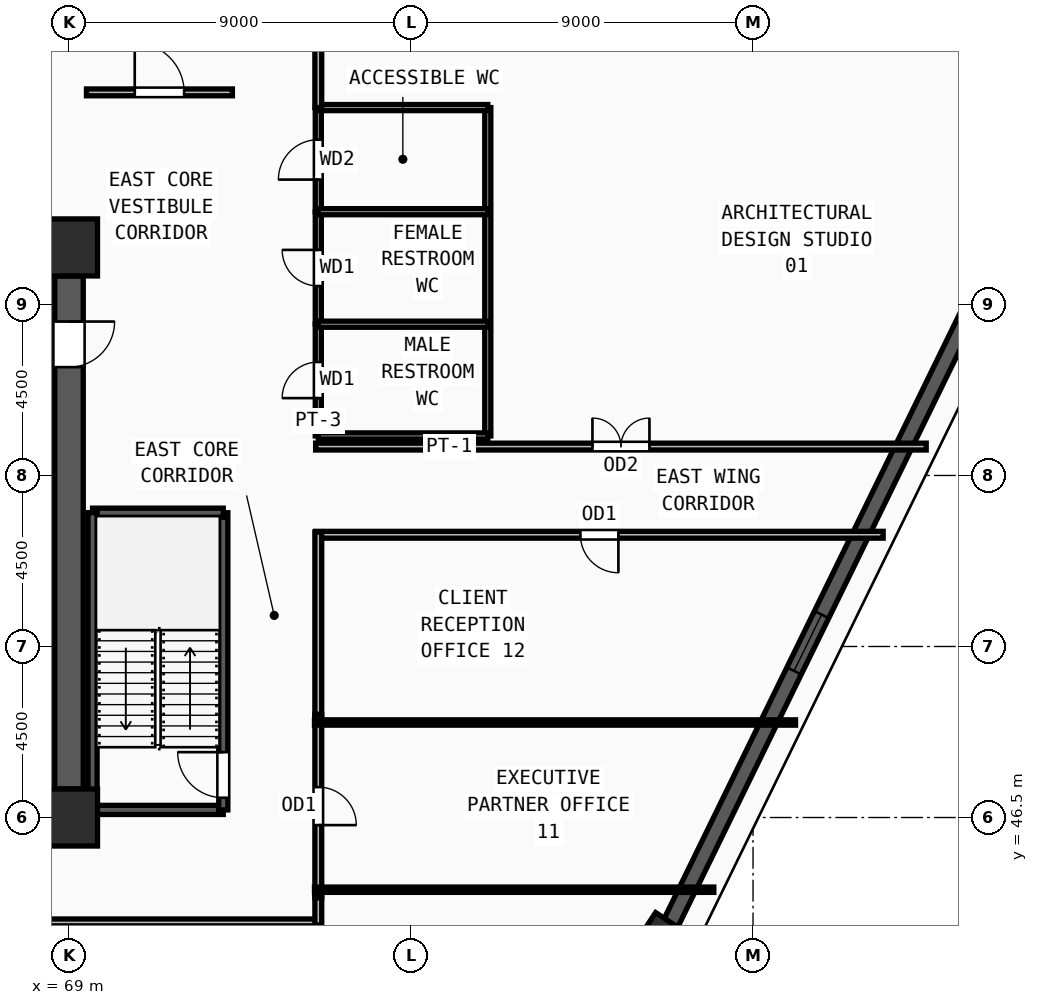
"""IFC4 building model, lengths in metres.
Left out: names, types, materials, properties, quantities, classifications, styles, units other than length and angle.
Written with IfcOpenShell. Run it as: python <this file> out.ifc"""

import sys

from ifc_helpers import new_model, si_unit, direction, frame, frame_2d, origin, origin_2d, place, context, subcontext, project, spatial, rectangle, extrude, source, transform, mapped, element, fill, save


model = new_model("IFC4")
c1 = context("Model", 3, precision=1e-05, world=origin(), true_north=direction((0.0, 1.0)))
c2 = subcontext(c1, "Body", "Model", "MODEL_VIEW")
j1 = project(units=[si_unit("LENGTHUNIT", "METRE"), si_unit("PLANEANGLEUNIT", "RADIAN")], contexts=[c1])
p1 = place(None, origin())
s1 = spatial("IfcSite", under=j1, at=p1, CompositionType="ELEMENT")
p2 = place(p1, origin())
s2 = spatial("IfcBuilding", under=s1, at=p2, CompositionType="ELEMENT")
p3 = place(p2, frame((0.0, 0.0, 102.0)))
s3 = spatial("IfcBuildingStorey", under=s2, at=p3, CompositionType="ELEMENT", Elevation=102.0)
m1 = source(origin(), c2, "Body", "SweptSolid", [
    extrude(rectangle(XDim=1.5, YDim=1.5, at=origin_2d()), origin(), (0.0, 0.0, 1.0), 3.75),
])
for number, where, z_axis, x_axis in (
    (1, (69.0, 46.5, 0.0), (0.0, 0.0, 1.0), (1.0, 0.0, 0.0)),
    (2, (69.0, 61.5, 0.0), (0.0, 0.0, 1.0), (1.0, 0.0, 0.0)),
):
    element("IfcColumn", number, at=place(p3, frame(where, z_axis=z_axis, x_axis=x_axis)), inside=s3, PredefinedType="COLUMN", context=c2, shape_type="MappedRepresentation", body=[
        mapped(m1, transform((0.0, 0.0, 0.0), x_axis=(1.0, 0.0, 0.0), y_axis=(0.0, 1.0, 0.0), z_axis=(0.0, 0.0, 1.0), scale=1.0)),
    ])
m2 = source(origin(), c2, "Body", "SweptSolid", [
    extrude(rectangle(XDim=1.4, YDim=1.15, at=origin_2d()), origin(), (0.0, 0.0, 1.0), 3.75),
])
p4 = place(p3, frame((84.533, 43.098, 0.0), z_axis=(0.0, 0.0, 1.0), x_axis=(0.549168685539, 0.83571152608, 0.0)))
e3 = element("IfcColumn", 3, at=p4, inside=s3, PredefinedType="COLUMN", context=c2, shape_type="MappedRepresentation", body=[
    mapped(m2, transform((0.0, 0.0, 0.0), x_axis=(1.0, 0.0, 0.0), y_axis=(0.0, 1.0, 0.0), z_axis=(0.0, 0.0, 1.0), scale=1.0)),
])
p5 = place(p3, frame((84.836, 43.718, 0.0), z_axis=(0.0, 0.0, 1.0), x_axis=(0.439006754844, 0.898483761234, 0.0)))
e4 = element("IfcWall", 4, at=p5, inside=s3, PredefinedType="SOLIDWALL", context=c2, shape_type="SweptSolid", body=[
    extrude(rectangle(XDim=26.656, YDim=0.42, at=frame_2d((13.328, 0.0))), origin(), (0.0, 0.0, 1.0), 3.57),
])
m3 = source(origin(), c2, "Body", "SweptSolid", [
    extrude(rectangle(XDim=1.65, YDim=1.95, at=frame_2d((0.825, 0.975))), frame((0.0, 0.22, 0.0), z_axis=(0.0, -1.0, 0.0), x_axis=(1.0, 0.0, 0.0)), (0.0, 0.0, 1.0), 0.44),
])
p6 = place(p5, frame((7.389, 0.0, 0.55)))
e5 = element("IfcOpeningElement", 5, at=p6, cuts=e4, PredefinedType="OPENING", context=c2, shape_type="MappedRepresentation", body=[
    mapped(m3, transform((0.0, 0.0, 0.0), x_axis=(1.0, 0.0, 0.0), y_axis=(0.0, 1.0, 0.0), z_axis=(0.0, 0.0, 1.0), scale=1.0)),
])
p7 = place(p5, frame((19.167, 0.0, 0.55)))
e6 = element("IfcOpeningElement", 6, at=p7, cuts=e4, PredefinedType="OPENING", context=c2, shape_type="MappedRepresentation", body=[
    mapped(m3, transform((0.0, 0.0, 0.0), x_axis=(1.0, 0.0, 0.0), y_axis=(0.0, 1.0, 0.0), z_axis=(0.0, 0.0, 1.0), scale=1.0)),
])
p8 = place(p3, frame((69.0, 60.75, 0.0), z_axis=(0.0, 0.0, 1.0), x_axis=(0.0, -1.0, 0.0)))
e7 = element("IfcWall", 7, at=p8, inside=s3, PredefinedType="SHEAR", context=c2, shape_type="SweptSolid", body=[
    extrude(rectangle(XDim=13.5, YDim=0.75, at=frame_2d((6.75, 0.0))), origin(), (0.0, 0.0, 1.0), 3.57),
])
m4 = source(origin(), c2, "Body", "SweptSolid", [
    extrude(rectangle(XDim=1.2, YDim=2.2, at=frame_2d((0.6, 1.1))), frame((0.0, 0.385, 0.0), z_axis=(0.0, -1.0, 0.0), x_axis=(1.0, 0.0, 0.0)), (0.0, 0.0, 1.0), 0.77),
])
p9 = place(p8, frame((1.2, 0.0, 0.0)))
e8 = element("IfcOpeningElement", 8, at=p9, cuts=e7, PredefinedType="OPENING", context=c2, shape_type="MappedRepresentation", body=[
    mapped(m4, transform((0.0, 0.0, 0.0), x_axis=(1.0, 0.0, 0.0), y_axis=(0.0, 1.0, 0.0), z_axis=(0.0, 0.0, 1.0), scale=1.0)),
])
p10 = place(p3, frame((69.62, 46.7, 0.0), z_axis=(0.0, 0.0, 1.0), x_axis=(1.0, 0.0, 0.0)))
e9 = element("IfcWall", 9, at=p10, inside=s3, PredefinedType="SOLIDWALL", context=c2, shape_type="SweptSolid", body=[
    extrude(rectangle(XDim=3.44, YDim=0.24, at=frame_2d((1.72, 0.0))), origin(), (0.0, 0.0, 1.0), 3.57),
])
p11 = place(p3, frame((73.06, 46.7, 0.0), z_axis=(0.0, 0.0, 1.0), x_axis=(0.0, 1.0, 0.0)))
e10 = element("IfcWall", 10, at=p11, inside=s3, PredefinedType="SOLIDWALL", context=c2, shape_type="SweptSolid", body=[
    extrude(rectangle(XDim=7.82, YDim=0.24, at=frame_2d((3.91, 0.0))), origin(), (0.0, 0.0, 1.0), 3.57),
])
m5 = source(origin(), c2, "Body", "SweptSolid", [
    extrude(rectangle(XDim=1.2, YDim=2.2, at=frame_2d((0.6, 1.1))), frame((0.0, 0.13, 0.0), z_axis=(0.0, -1.0, 0.0), x_axis=(1.0, 0.0, 0.0)), (0.0, 0.0, 1.0), 0.26),
])
p12 = place(p11, frame((0.32, 0.0, 0.0)))
e11 = element("IfcOpeningElement", 11, at=p12, cuts=e10, PredefinedType="OPENING", context=c2, shape_type="MappedRepresentation", body=[
    mapped(m5, transform((0.0, 0.0, 0.0), x_axis=(1.0, 0.0, 0.0), y_axis=(0.0, 1.0, 0.0), z_axis=(0.0, 0.0, 1.0), scale=1.0)),
])
p13 = place(p3, frame((73.06, 54.52, 0.0), z_axis=(0.0, 0.0, 1.0), x_axis=(-1.0, 0.0, 0.0)))
e12 = element("IfcWall", 12, at=p13, inside=s3, PredefinedType="SOLIDWALL", context=c2, shape_type="SweptSolid", body=[
    extrude(rectangle(XDim=3.44, YDim=0.24, at=frame_2d((1.72, 0.0))), origin(), (0.0, 0.0, 1.0), 3.57),
])
p14 = place(p3, frame((69.62, 54.52, 0.0), z_axis=(0.0, 0.0, 1.0), x_axis=(0.0, -1.0, 0.0)))
e13 = element("IfcWall", 13, at=p14, inside=s3, PredefinedType="SOLIDWALL", context=c2, shape_type="SweptSolid", body=[
    extrude(rectangle(XDim=7.82, YDim=0.24, at=frame_2d((3.91, 0.0))), origin(), (0.0, 0.0, 1.0), 3.57),
])
p15 = place(p3, frame((75.56, 56.54, 0.0), z_axis=(0.0, 0.0, 1.0), x_axis=(0.0, 1.0, 0.0)))
e14 = element("IfcWall", 14, at=p15, inside=s3, PredefinedType="PARTITIONING", context=c2, shape_type="SweptSolid", body=[
    extrude(rectangle(XDim=2.94, YDim=0.16, at=frame_2d((1.47, 0.0))), origin(), (0.0, 0.0, 1.0), 3.57),
])
m6 = source(origin(), c2, "Body", "SweptSolid", [
    extrude(rectangle(XDim=0.95, YDim=2.15, at=frame_2d((0.475, 1.075))), frame((0.0, 0.09, 0.0), z_axis=(0.0, -1.0, 0.0), x_axis=(1.0, 0.0, 0.0)), (0.0, 0.0, 1.0), 0.18),
])
p16 = place(p15, frame((0.995, 0.0, 0.0)))
e15 = element("IfcOpeningElement", 15, at=p16, cuts=e14, PredefinedType="OPENING", context=c2, shape_type="MappedRepresentation", body=[
    mapped(m6, transform((0.0, 0.0, 0.0), x_axis=(1.0, 0.0, 0.0), y_axis=(0.0, 1.0, 0.0), z_axis=(0.0, 0.0, 1.0), scale=1.0)),
])
p17 = place(p3, frame((75.56, 59.48, 0.0), z_axis=(0.0, 0.0, 1.0), x_axis=(0.0, 1.0, 0.0)))
e16 = element("IfcWall", 16, at=p17, inside=s3, PredefinedType="PARTITIONING", context=c2, shape_type="SweptSolid", body=[
    extrude(rectangle(XDim=2.96, YDim=0.16, at=frame_2d((1.48, 0.0))), origin(), (0.0, 0.0, 1.0), 3.57),
])
p18 = place(p17, frame((1.005, 0.0, 0.0)))
e17 = element("IfcOpeningElement", 17, at=p18, cuts=e16, PredefinedType="OPENING", context=c2, shape_type="MappedRepresentation", body=[
    mapped(m6, transform((0.0, 0.0, 0.0), x_axis=(1.0, 0.0, 0.0), y_axis=(0.0, 1.0, 0.0), z_axis=(0.0, 0.0, 1.0), scale=1.0)),
])
p19 = place(p3, frame((75.56, 62.44, 0.0), z_axis=(0.0, 0.0, 1.0), x_axis=(0.0, 1.0, 0.0)))
e18 = element("IfcWall", 18, at=p19, inside=s3, PredefinedType="PARTITIONING", context=c2, shape_type="SweptSolid", body=[
    extrude(rectangle(XDim=2.74, YDim=0.16, at=frame_2d((1.37, 0.0))), origin(), (0.0, 0.0, 1.0), 3.57),
])
m7 = source(origin(), c2, "Body", "SweptSolid", [
    extrude(rectangle(XDim=1.05, YDim=2.15, at=frame_2d((0.525, 1.075))), frame((0.0, 0.09, 0.0), z_axis=(0.0, -1.0, 0.0), x_axis=(1.0, 0.0, 0.0)), (0.0, 0.0, 1.0), 0.18),
])
p20 = place(p19, frame((0.845, 0.0, 0.0)))
e19 = element("IfcOpeningElement", 19, at=p20, cuts=e18, PredefinedType="OPENING", context=c2, shape_type="MappedRepresentation", body=[
    mapped(m7, transform((0.0, 0.0, 0.0), x_axis=(1.0, 0.0, 0.0), y_axis=(0.0, 1.0, 0.0), z_axis=(0.0, 0.0, 1.0), scale=1.0)),
])
p21 = place(p3, frame((69.46, 65.58, 0.0), z_axis=(0.0, 0.0, 1.0), x_axis=(1.0, 0.0, 0.0)))
e20 = element("IfcWall", 20, at=p21, inside=s3, PredefinedType="PARTITIONING", context=c2, shape_type="SweptSolid", body=[
    extrude(rectangle(XDim=3.84, YDim=0.18, at=frame_2d((1.92, 0.0))), origin(), (0.0, 0.0, 1.0), 3.57),
])
m8 = source(origin(), c2, "Body", "SweptSolid", [
    extrude(rectangle(XDim=1.3, YDim=2.2, at=frame_2d((0.65, 1.1))), frame((0.0, 0.1, 0.0), z_axis=(0.0, -1.0, 0.0), x_axis=(1.0, 0.0, 0.0)), (0.0, 0.0, 1.0), 0.2),
])
p22 = place(p21, frame((1.27, 0.0, 0.0)))
e21 = element("IfcOpeningElement", 21, at=p22, cuts=e20, PredefinedType="OPENING", context=c2, shape_type="MappedRepresentation", body=[
    mapped(m8, transform((0.0, 0.0, 0.0), x_axis=(1.0, 0.0, 0.0), y_axis=(0.0, 1.0, 0.0), z_axis=(0.0, 0.0, 1.0), scale=1.0)),
])
p23 = place(p3, frame((75.49, 56.26, 0.0), z_axis=(0.0, 0.0, 1.0), x_axis=(1.0, 0.0, 0.0)))
e22 = element("IfcWall", 22, at=p23, inside=s3, PredefinedType="PARTITIONING", context=c2, shape_type="SweptSolid", body=[
    extrude(rectangle(XDim=16.067, YDim=0.18, at=frame_2d((8.033, 0.0))), origin(), (0.0, 0.0, 1.0), 3.57),
])
m9 = source(origin(), c2, "Body", "SweptSolid", [
    extrude(rectangle(XDim=1.5, YDim=2.2, at=frame_2d((0.75, 1.1))), frame((0.0, 0.1, 0.0), z_axis=(0.0, -1.0, 0.0), x_axis=(1.0, 0.0, 0.0)), (0.0, 0.0, 1.0), 0.2),
])
p24 = place(p23, frame((7.284, 0.0, 0.0)))
e23 = element("IfcOpeningElement", 23, at=p24, cuts=e22, PredefinedType="OPENING", context=c2, shape_type="MappedRepresentation", body=[
    mapped(m9, transform((0.0, 0.0, 0.0), x_axis=(1.0, 0.0, 0.0), y_axis=(0.0, 1.0, 0.0), z_axis=(0.0, 0.0, 1.0), scale=1.0)),
])
p25 = place(p3, frame((75.63, 43.74, 0.0), z_axis=(0.0, 0.0, 1.0), x_axis=(-1.0, 0.0, 0.0)))
e24 = element("IfcWall", 24, at=p25, inside=s3, PredefinedType="PARTITIONING", context=c2, shape_type="SweptSolid", body=[
    extrude(rectangle(XDim=21.915, YDim=0.18, at=frame_2d((10.958, 0.0))), origin(), (0.0, 0.0, 1.0), 3.57),
])
p26 = place(p25, frame((9.907, 0.0, 0.0)))
e25 = element("IfcOpeningElement", 25, at=p26, cuts=e24, PredefinedType="OPENING", context=c2, shape_type="MappedRepresentation", body=[
    mapped(m9, transform((0.0, 0.0, 0.0), x_axis=(1.0, 0.0, 0.0), y_axis=(0.0, 1.0, 0.0), z_axis=(0.0, 0.0, 1.0), scale=1.0)),
])
p27 = place(p3, frame((75.56, 49.215, 0.0), z_axis=(0.0, 0.0, 1.0), x_axis=(0.0, -1.0, 0.0)))
e26 = element("IfcWall", 26, at=p27, inside=s3, PredefinedType="PARTITIONING", context=c2, shape_type="SweptSolid", body=[
    extrude(rectangle(XDim=4.83, YDim=0.18, at=frame_2d((2.415, 0.0))), origin(), (0.0, 0.0, 1.0), 3.57),
])
m10 = source(origin(), c2, "Body", "SweptSolid", [
    extrude(rectangle(XDim=1.0, YDim=2.2, at=frame_2d((0.5, 1.1))), frame((0.0, 0.1, 0.0), z_axis=(0.0, -1.0, 0.0), x_axis=(1.0, 0.0, 0.0)), (0.0, 0.0, 1.0), 0.2),
])
p28 = place(p27, frame((1.915, 0.0, 0.0)))
e27 = element("IfcOpeningElement", 27, at=p28, cuts=e26, PredefinedType="OPENING", context=c2, shape_type="MappedRepresentation", body=[
    mapped(m10, transform((0.0, 0.0, 0.0), x_axis=(1.0, 0.0, 0.0), y_axis=(0.0, 1.0, 0.0), z_axis=(0.0, 0.0, 1.0), scale=1.0)),
])
p29 = place(p3, frame((90.424, 53.94, 0.0), z_axis=(0.0, 0.0, 1.0), x_axis=(-1.0, 0.0, 0.0)))
e28 = element("IfcWall", 28, at=p29, inside=s3, PredefinedType="PARTITIONING", context=c2, shape_type="SweptSolid", body=[
    extrude(rectangle(XDim=14.934, YDim=0.18, at=frame_2d((7.467, 0.0))), origin(), (0.0, 0.0, 1.0), 3.57),
])
p30 = place(p29, frame((6.967, 0.0, 0.0)))
e29 = element("IfcOpeningElement", 29, at=p30, cuts=e28, PredefinedType="OPENING", context=c2, shape_type="MappedRepresentation", body=[
    mapped(m10, transform((0.0, 0.0, 0.0), x_axis=(1.0, 0.0, 0.0), y_axis=(0.0, 1.0, 0.0), z_axis=(0.0, 0.0, 1.0), scale=1.0)),
])
p31 = place(p3, frame((80.02, 56.54, 0.0), z_axis=(0.0, 0.0, 1.0), x_axis=(0.0, 1.0, 0.0)))
e30 = element("IfcWall", 30, at=p31, inside=s3, PredefinedType="PARTITIONING", context=c2, shape_type="SweptSolid", body=[
    extrude(rectangle(XDim=8.64, YDim=0.16, at=frame_2d((4.32, 0.0))), origin(), (0.0, 0.0, 1.0), 3.57),
])
for number, where, z_axis, x_axis in (
    (31, (75.56, 56.54, 0.0), (0.0, 0.0, 1.0), (1.0, 0.0, 0.0)),
    (32, (75.56, 59.48, 0.0), (0.0, 0.0, 1.0), (1.0, 0.0, 0.0)),
    (33, (75.56, 62.44, 0.0), (0.0, 0.0, 1.0), (1.0, 0.0, 0.0)),
    (34, (75.56, 65.18, 0.0), (0.0, 0.0, 1.0), (1.0, 0.0, 0.0)),
):
    element("IfcWall", number, at=place(p3, frame(where, z_axis=z_axis, x_axis=x_axis)), inside=s3, PredefinedType="PARTITIONING", context=c2, shape_type="SweptSolid", body=[
        extrude(rectangle(XDim=4.46, YDim=0.16, at=frame_2d((2.23, 0.0))), origin(), (0.0, 0.0, 1.0), 3.57),
    ])
p32 = place(p3, frame((75.56, 67.215, 0.0), z_axis=(0.0, 0.0, 1.0), x_axis=(0.0, -1.0, 0.0)))
e35 = element("IfcWall", 35, at=p32, inside=s3, PredefinedType="PARTITIONING", context=c2, shape_type="SweptSolid", body=[
    extrude(rectangle(XDim=2.035, YDim=0.18, at=frame_2d((1.018, 0.0))), origin(), (0.0, 0.0, 1.0), 3.57),
])
p33 = place(p3, frame((75.56, 44.385, 0.0), z_axis=(0.0, 0.0, 1.0), x_axis=(0.0, -1.0, 0.0)))
e36 = element("IfcWall", 36, at=p33, inside=s3, PredefinedType="PARTITIONING", context=c2, shape_type="SweptSolid", body=[
    extrude(rectangle(XDim=0.715, YDim=0.18, at=frame_2d((0.357, 0.0))), origin(), (0.0, 0.0, 1.0), 3.57),
])
p34 = place(p3, frame((75.56, 54.01, 0.0), z_axis=(0.0, 0.0, 1.0), x_axis=(0.0, -1.0, 0.0)))
e37 = element("IfcWall", 37, at=p34, inside=s3, PredefinedType="PARTITIONING", context=c2, shape_type="SweptSolid", body=[
    extrude(rectangle(XDim=4.795, YDim=0.18, at=frame_2d((2.397, 0.0))), origin(), (0.0, 0.0, 1.0), 3.57),
])
p35 = place(p3, frame((75.46, 44.6, 0.0), z_axis=(0.0, 0.0, 1.0), x_axis=(1.0, 0.0, 0.0)))
e38 = element("IfcWall", 38, at=p35, inside=s3, PredefinedType="PARTITIONING", context=c2, shape_type="SweptSolid", body=[
    extrude(rectangle(XDim=10.508, YDim=0.14, at=frame_2d((5.254, 0.0))), origin(), (0.0, 0.0, 1.0), 3.57),
])
p36 = place(p3, frame((75.46, 49.0, 0.0), z_axis=(0.0, 0.0, 1.0), x_axis=(1.0, 0.0, 0.0)))
e39 = element("IfcWall", 39, at=p36, inside=s3, PredefinedType="PARTITIONING", context=c2, shape_type="SweptSolid", body=[
    extrude(rectangle(XDim=12.658, YDim=0.14, at=frame_2d((6.329, 0.0))), origin(), (0.0, 0.0, 1.0), 3.57),
])
m11 = source(origin(), c2, "Body", "SweptSolid", [
    extrude(rectangle(XDim=1.65, YDim=1.95, at=frame_2d((0.825, 0.975))), frame((0.0, 0.03, 0.0), z_axis=(0.0, -1.0, 0.0), x_axis=(1.0, 0.0, 0.0)), (0.0, 0.0, 1.0), 0.06),
])
p37 = place(p6, origin())
e40 = element("IfcWindow", 40, at=p37, inside=s3, PartitioningType="DOUBLE_PANEL_VERTICAL", PredefinedType="WINDOW", context=c2, shape_type="MappedRepresentation", body=[
    mapped(m11, transform((0.0, 0.0, 0.0), x_axis=(1.0, 0.0, 0.0), y_axis=(0.0, 1.0, 0.0), z_axis=(0.0, 0.0, 1.0), scale=1.0)),
])
fill(e5, e40)
m12 = source(origin(), c2, "Body", "SweptSolid", [
    extrude(rectangle(XDim=1.2, YDim=2.2, at=frame_2d((0.6, 1.1))), frame((0.0, 0.025, 0.0), z_axis=(0.0, -1.0, 0.0), x_axis=(1.0, 0.0, 0.0)), (0.0, 0.0, 1.0), 0.05),
])
p38 = place(p9, origin())
e41 = element("IfcDoor", 41, at=p38, inside=s3, OperationType="SINGLE_SWING_LEFT", PredefinedType="DOOR", context=c2, shape_type="MappedRepresentation", body=[
    mapped(m12, transform((0.0, 0.0, 0.0), x_axis=(1.0, 0.0, 0.0), y_axis=(0.0, 1.0, 0.0), z_axis=(0.0, 0.0, 1.0), scale=1.0)),
])
fill(e8, e41)
p39 = place(p12, origin())
e42 = element("IfcDoor", 42, at=p39, inside=s3, OperationType="SINGLE_SWING_RIGHT", PredefinedType="DOOR", context=c2, shape_type="MappedRepresentation", body=[
    mapped(m12, transform((0.0, 0.0, 0.0), x_axis=(1.0, 0.0, 0.0), y_axis=(0.0, 1.0, 0.0), z_axis=(0.0, 0.0, 1.0), scale=1.0)),
])
fill(e11, e42)
m13 = source(origin(), c2, "Body", "SweptSolid", [
    extrude(rectangle(XDim=0.95, YDim=2.15, at=frame_2d((0.475, 1.075))), frame((0.0, 0.025, 0.0), z_axis=(0.0, -1.0, 0.0), x_axis=(1.0, 0.0, 0.0)), (0.0, 0.0, 1.0), 0.05),
])
p40 = place(p16, origin())
e43 = element("IfcDoor", 43, at=p40, inside=s3, OperationType="SINGLE_SWING_LEFT", PredefinedType="DOOR", context=c2, shape_type="MappedRepresentation", body=[
    mapped(m13, transform((0.0, 0.0, 0.0), x_axis=(1.0, 0.0, 0.0), y_axis=(0.0, 1.0, 0.0), z_axis=(0.0, 0.0, 1.0), scale=1.0)),
])
fill(e15, e43)
p41 = place(p18, origin())
e44 = element("IfcDoor", 44, at=p41, inside=s3, OperationType="SINGLE_SWING_RIGHT", PredefinedType="DOOR", context=c2, shape_type="MappedRepresentation", body=[
    mapped(m13, transform((0.0, 0.0, 0.0), x_axis=(1.0, 0.0, 0.0), y_axis=(0.0, 1.0, 0.0), z_axis=(0.0, 0.0, 1.0), scale=1.0)),
])
fill(e17, e44)
m14 = source(origin(), c2, "Body", "SweptSolid", [
    extrude(rectangle(XDim=1.05, YDim=2.15, at=frame_2d((0.525, 1.075))), frame((0.0, 0.025, 0.0), z_axis=(0.0, -1.0, 0.0), x_axis=(1.0, 0.0, 0.0)), (0.0, 0.0, 1.0), 0.05),
])
p42 = place(p20, origin())
e45 = element("IfcDoor", 45, at=p42, inside=s3, OperationType="SINGLE_SWING_LEFT", PredefinedType="DOOR", context=c2, shape_type="MappedRepresentation", body=[
    mapped(m14, transform((0.0, 0.0, 0.0), x_axis=(1.0, 0.0, 0.0), y_axis=(0.0, 1.0, 0.0), z_axis=(0.0, 0.0, 1.0), scale=1.0)),
])
fill(e19, e45)
m15 = source(origin(), c2, "Body", "SweptSolid", [
    extrude(rectangle(XDim=1.3, YDim=2.2, at=frame_2d((0.65, 1.1))), frame((0.0, 0.025, 0.0), z_axis=(0.0, -1.0, 0.0), x_axis=(1.0, 0.0, 0.0)), (0.0, 0.0, 1.0), 0.05),
])
p43 = place(p22, origin())
e46 = element("IfcDoor", 46, at=p43, inside=s3, OperationType="SINGLE_SWING_LEFT", PredefinedType="DOOR", context=c2, shape_type="MappedRepresentation", body=[
    mapped(m15, transform((0.0, 0.0, 0.0), x_axis=(1.0, 0.0, 0.0), y_axis=(0.0, 1.0, 0.0), z_axis=(0.0, 0.0, 1.0), scale=1.0)),
])
fill(e21, e46)
m16 = source(origin(), c2, "Body", "SweptSolid", [
    extrude(rectangle(XDim=1.5, YDim=2.2, at=frame_2d((0.75, 1.1))), frame((0.0, 0.025, 0.0), z_axis=(0.0, -1.0, 0.0), x_axis=(1.0, 0.0, 0.0)), (0.0, 0.0, 1.0), 0.05),
])
p44 = place(p24, origin())
e47 = element("IfcDoor", 47, at=p44, inside=s3, OperationType="DOUBLE_DOOR_SINGLE_SWING", PredefinedType="DOOR", context=c2, shape_type="MappedRepresentation", body=[
    mapped(m16, transform((0.0, 0.0, 0.0), x_axis=(1.0, 0.0, 0.0), y_axis=(0.0, 1.0, 0.0), z_axis=(0.0, 0.0, 1.0), scale=1.0)),
])
fill(e23, e47)
m17 = source(origin(), c2, "Body", "SweptSolid", [
    extrude(rectangle(XDim=1.0, YDim=2.2, at=frame_2d((0.5, 1.1))), frame((0.0, 0.025, 0.0), z_axis=(0.0, -1.0, 0.0), x_axis=(1.0, 0.0, 0.0)), (0.0, 0.0, 1.0), 0.05),
])
p45 = place(p28, origin())
e48 = element("IfcDoor", 48, at=p45, inside=s3, OperationType="SINGLE_SWING_RIGHT", PredefinedType="DOOR", context=c2, shape_type="MappedRepresentation", body=[
    mapped(m17, transform((0.0, 0.0, 0.0), x_axis=(1.0, 0.0, 0.0), y_axis=(0.0, 1.0, 0.0), z_axis=(0.0, 0.0, 1.0), scale=1.0)),
])
fill(e27, e48)
p46 = place(p30, origin())
e49 = element("IfcDoor", 49, at=p46, inside=s3, OperationType="SINGLE_SWING_LEFT", PredefinedType="DOOR", context=c2, shape_type="MappedRepresentation", body=[
    mapped(m17, transform((0.0, 0.0, 0.0), x_axis=(1.0, 0.0, 0.0), y_axis=(0.0, 1.0, 0.0), z_axis=(0.0, 0.0, 1.0), scale=1.0)),
])
fill(e29, e49)
save(model, sys.argv[1])
